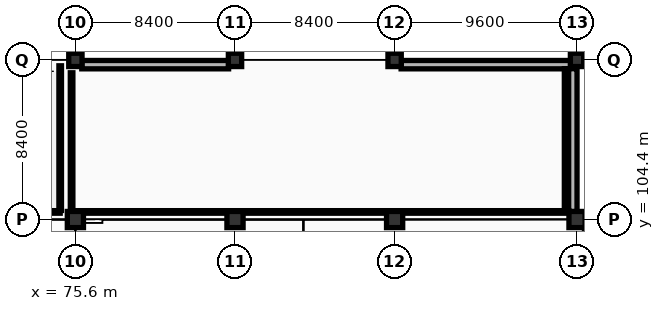
"""IFC4 building model, lengths in metres.
Left out: names, types, materials, properties, quantities, classifications, styles, units other than length and angle.
Written with IfcOpenShell. Run it as: python <this file> out.ifc"""

import sys

from ifc_helpers import new_model, si_unit, direction, frame, frame_2d, origin, origin_2d, place, context, subcontext, project, spatial, rectangle, extrude, element, fill, save


model = new_model("IFC4")
c1 = context("Model", 3, precision=1e-05, world=origin(), true_north=direction((0.0, 1.0)))
c2 = subcontext(c1, "Body", "Model", "MODEL_VIEW")
j1 = project(units=[si_unit("LENGTHUNIT", "METRE"), si_unit("PLANEANGLEUNIT", "RADIAN")], contexts=[c1])
p1 = place(None, origin())
s1 = spatial("IfcSite", under=j1, at=p1, CompositionType="ELEMENT")
p2 = place(p1, origin())
s2 = spatial("IfcBuilding", under=s1, at=p2, CompositionType="ELEMENT")
p3 = place(p2, origin())
s3 = spatial("IfcBuildingStorey", under=s2, at=p3, CompositionType="ELEMENT", Elevation=0.0)
p4 = place(p3, frame((75.6, 104.4, 0.0), z_axis=(0.0, 0.0, 1.0), x_axis=(1.0, 0.0, 0.0)))
e1 = element("IfcColumn", 1, at=p4, inside=s3, PredefinedType="COLUMN", context=c2, shape_type="SweptSolid", body=[
    extrude(rectangle(XDim=0.85, YDim=0.85, at=origin_2d()), origin(), (0.0, 0.0, 1.0), 5.4),
])
p5 = place(p3, frame((75.6, 112.8, 0.0), z_axis=(0.0, 0.0, 1.0), x_axis=(1.0, 0.0, 0.0)))
e2 = element("IfcColumn", 2, at=p5, inside=s3, PredefinedType="COLUMN", context=c2, shape_type="SweptSolid", body=[
    extrude(rectangle(XDim=0.7, YDim=0.7, at=origin_2d()), origin(), (0.0, 0.0, 1.0), 5.4),
])
p6 = place(p3, frame((84.0, 104.4, 0.0), z_axis=(0.0, 0.0, 1.0), x_axis=(1.0, 0.0, 0.0)))
e3 = element("IfcColumn", 3, at=p6, inside=s3, PredefinedType="COLUMN", context=c2, shape_type="SweptSolid", body=[
    extrude(rectangle(XDim=0.85, YDim=0.85, at=origin_2d()), origin(), (0.0, 0.0, 1.0), 5.4),
])
p7 = place(p3, frame((84.0, 112.8, 0.0), z_axis=(0.0, 0.0, 1.0), x_axis=(1.0, 0.0, 0.0)))
e4 = element("IfcColumn", 4, at=p7, inside=s3, PredefinedType="COLUMN", context=c2, shape_type="SweptSolid", body=[
    extrude(rectangle(XDim=0.7, YDim=0.7, at=origin_2d()), origin(), (0.0, 0.0, 1.0), 5.4),
])
p8 = place(p3, frame((92.4, 104.4, 0.0), z_axis=(0.0, 0.0, 1.0), x_axis=(1.0, 0.0, 0.0)))
e5 = element("IfcColumn", 5, at=p8, inside=s3, PredefinedType="COLUMN", context=c2, shape_type="SweptSolid", body=[
    extrude(rectangle(XDim=0.85, YDim=0.85, at=origin_2d()), origin(), (0.0, 0.0, 1.0), 5.4),
])
p9 = place(p3, frame((92.4, 112.8, 0.0), z_axis=(0.0, 0.0, 1.0), x_axis=(1.0, 0.0, 0.0)))
e6 = element("IfcColumn", 6, at=p9, inside=s3, PredefinedType="COLUMN", context=c2, shape_type="SweptSolid", body=[
    extrude(rectangle(XDim=0.7, YDim=0.7, at=origin_2d()), origin(), (0.0, 0.0, 1.0), 5.4),
])
p10 = place(p3, frame((102.0, 104.4, 0.0), z_axis=(0.0, 0.0, 1.0), x_axis=(1.0, 0.0, 0.0)))
e7 = element("IfcColumn", 7, at=p10, inside=s3, PredefinedType="COLUMN", context=c2, shape_type="SweptSolid", body=[
    extrude(rectangle(XDim=0.85, YDim=0.85, at=origin_2d()), origin(), (0.0, 0.0, 1.0), 5.4),
])
p11 = place(p3, frame((102.0, 112.8, 0.0), z_axis=(0.0, 0.0, 1.0), x_axis=(1.0, 0.0, 0.0)))
e8 = element("IfcColumn", 8, at=p11, inside=s3, PredefinedType="COLUMN", context=c2, shape_type="SweptSolid", body=[
    extrude(rectangle(XDim=0.7, YDim=0.7, at=origin_2d()), origin(), (0.0, 0.0, 1.0), 5.4),
])
p12 = place(p3, frame((75.937, 112.55, 0.0), z_axis=(0.0, 0.0, 1.0), x_axis=(1.0, 0.0, 0.0)))
e9 = element("IfcWall", 9, at=p12, inside=s3, PredefinedType="STANDARD", context=c2, shape_type="SweptSolid", body=[
    extrude(rectangle(XDim=7.726, YDim=0.44, at=frame_2d((3.863, 0.0))), origin(), (0.0, 0.0, 1.0), 4.67),
])
p13 = place(p12, frame((2.663, 0.0, 0.0)))
e10 = element("IfcOpeningElement", 10, at=p13, cuts=e9, PredefinedType="OPENING", context=c2, shape_type="SweptSolid", body=[
    extrude(rectangle(XDim=2.4, YDim=2.8, at=frame_2d((1.2, 1.4))), frame((0.0, 0.23, 0.0), z_axis=(0.0, -1.0, 0.0), x_axis=(1.0, 0.0, 0.0)), (0.0, 0.0, 1.0), 0.46),
])
p14 = place(p3, frame((92.742, 112.55, 0.0), z_axis=(0.0, 0.0, 1.0), x_axis=(1.0, 0.0, 0.0)))
e11 = element("IfcWall", 11, at=p14, inside=s3, PredefinedType="STANDARD", context=c2, shape_type="SweptSolid", body=[
    extrude(rectangle(XDim=8.921, YDim=0.44, at=frame_2d((4.46, 0.0))), origin(), (0.0, 0.0, 1.0), 4.62),
])
p15 = place(p14, frame((3.258, 0.0, 0.0)))
e12 = element("IfcOpeningElement", 12, at=p15, cuts=e11, PredefinedType="OPENING", context=c2, shape_type="SweptSolid", body=[
    extrude(rectangle(XDim=2.4, YDim=2.8, at=frame_2d((1.2, 1.4))), frame((0.0, 0.23, 0.0), z_axis=(0.0, -1.0, 0.0), x_axis=(1.0, 0.0, 0.0)), (0.0, 0.0, 1.0), 0.46),
])
p16 = place(p3, frame((101.78, 112.338, 0.0), z_axis=(0.0, 0.0, 1.0), x_axis=(0.0, -1.0, 0.0)))
e13 = element("IfcWall", 13, at=p16, inside=s3, PredefinedType="STANDARD", context=c2, shape_type="SweptSolid", body=[
    extrude(rectangle(XDim=7.521, YDim=0.44, at=frame_2d((3.76, 0.0))), origin(), (0.0, 0.0, 1.0), 4.27),
])
p17 = place(p16, frame((1.563, 0.0, 0.9)))
e14 = element("IfcOpeningElement", 14, at=p17, cuts=e13, PredefinedType="OPENING", context=c2, shape_type="SweptSolid", body=[
    extrude(rectangle(XDim=1.2, YDim=1.85, at=frame_2d((0.6, 0.925))), frame((0.0, 0.23, 0.0), z_axis=(0.0, -1.0, 0.0), x_axis=(1.0, 0.0, 0.0)), (0.0, 0.0, 1.0), 0.46),
])
p18 = place(p16, frame((4.713, 0.0, 0.9)))
e15 = element("IfcOpeningElement", 15, at=p18, cuts=e13, PredefinedType="OPENING", context=c2, shape_type="SweptSolid", body=[
    extrude(rectangle(XDim=1.2, YDim=1.85, at=frame_2d((0.6, 0.925))), frame((0.0, 0.23, 0.0), z_axis=(0.0, -1.0, 0.0), x_axis=(1.0, 0.0, 0.0)), (0.0, 0.0, 1.0), 0.46),
])
p19 = place(p3, frame((74.8, 104.8, 0.0), z_axis=(0.0, 0.0, 1.0), x_axis=(-1.0, 0.0, 0.0)))
e16 = element("IfcWall", 16, at=p19, inside=s3, PredefinedType="PARTITIONING", context=c2, shape_type="SweptSolid", body=[
    extrude(rectangle(XDim=15.4, YDim=0.135, at=frame_2d((7.7, 0.0))), origin(), (0.0, 0.0, 1.0), 4.27),
])
p20 = place(p19, frame((2.413, 0.0, 0.0)))
e17 = element("IfcOpeningElement", 17, at=p20, cuts=e16, PredefinedType="OPENING", context=c2, shape_type="SweptSolid", body=[
    extrude(rectangle(XDim=0.95, YDim=2.15, at=frame_2d((0.475, 1.075))), frame((0.0, 0.077, 0.0), z_axis=(0.0, -1.0, 0.0), x_axis=(1.0, 0.0, 0.0)), (0.0, 0.0, 1.0), 0.155),
])
p21 = place(p3, frame((74.8, 112.49, 0.0), z_axis=(0.0, 0.0, 1.0), x_axis=(0.0, -1.0, 0.0)))
e18 = element("IfcWall", 18, at=p21, inside=s3, PredefinedType="PARTITIONING", context=c2, shape_type="SweptSolid", body=[
    extrude(rectangle(XDim=7.613, YDim=0.135, at=frame_2d((3.806, 0.0))), origin(), (0.0, 0.0, 1.0), 4.67),
])
p22 = place(p3, frame((101.566, 104.8, 0.0), z_axis=(0.0, 0.0, 1.0), x_axis=(-1.0, 0.0, 0.0)))
e19 = element("IfcWall", 19, at=p22, inside=s3, PredefinedType="PARTITIONING", context=c2, shape_type="SweptSolid", body=[
    extrude(rectangle(XDim=26.166, YDim=0.135, at=frame_2d((13.083, 0.0))), origin(), (0.0, 0.0, 1.0), 4.27),
])
p23 = place(p22, frame((21.189, 0.0, 0.0)))
e20 = element("IfcOpeningElement", 20, at=p23, cuts=e19, PredefinedType="OPENING", context=c2, shape_type="SweptSolid", body=[
    extrude(rectangle(XDim=0.95, YDim=2.15, at=frame_2d((0.475, 1.075))), frame((0.0, 0.077, 0.0), z_axis=(0.0, -1.0, 0.0), x_axis=(1.0, 0.0, 0.0)), (0.0, 0.0, 1.0), 0.155),
])
p24 = place(p3, frame((75.4, 104.877, 0.0), z_axis=(0.0, 0.0, 1.0), x_axis=(0.0, 1.0, 0.0)))
e21 = element("IfcWall", 21, at=p24, inside=s3, PredefinedType="PARTITIONING", context=c2, shape_type="SweptSolid", body=[
    extrude(rectangle(XDim=7.245, YDim=0.135, at=frame_2d((3.623, 0.0))), origin(), (0.0, 0.0, 1.0), 4.27),
])
p25 = place(p3, frame((101.4, 112.336, 0.0), z_axis=(0.0, 0.0, 1.0), x_axis=(0.0, -1.0, 0.0)))
e22 = element("IfcWall", 22, at=p25, inside=s3, PredefinedType="PARTITIONING", context=c2, shape_type="SweptSolid", body=[
    extrude(rectangle(XDim=7.458, YDim=0.135, at=frame_2d((3.729, 0.0))), origin(), (0.0, 0.0, 1.0), 4.57),
])
p26 = place(p13, origin())
e23 = element("IfcDoor", 23, at=p26, inside=s3, OperationType="DOUBLE_DOOR_SINGLE_SWING", PredefinedType="DOOR", context=c2, shape_type="SweptSolid", body=[
    extrude(rectangle(XDim=2.4, YDim=2.8, at=frame_2d((1.2, 1.4))), frame((0.0, 0.025, 0.0), z_axis=(0.0, -1.0, 0.0), x_axis=(1.0, 0.0, 0.0)), (0.0, 0.0, 1.0), 0.05),
])
fill(e10, e23)
p27 = place(p15, origin())
e24 = element("IfcDoor", 24, at=p27, inside=s3, OperationType="DOUBLE_DOOR_SINGLE_SWING", PredefinedType="DOOR", context=c2, shape_type="SweptSolid", body=[
    extrude(rectangle(XDim=2.4, YDim=2.8, at=frame_2d((1.2, 1.4))), frame((0.0, 0.025, 0.0), z_axis=(0.0, -1.0, 0.0), x_axis=(1.0, 0.0, 0.0)), (0.0, 0.0, 1.0), 0.05),
])
fill(e12, e24)
p28 = place(p17, origin())
e25 = element("IfcWindow", 25, at=p28, inside=s3, PartitioningType="SINGLE_PANEL", PredefinedType="WINDOW", context=c2, shape_type="SweptSolid", body=[
    extrude(rectangle(XDim=1.2, YDim=1.85, at=frame_2d((0.6, 0.925))), frame((0.0, 0.03, 0.0), z_axis=(0.0, -1.0, 0.0), x_axis=(1.0, 0.0, 0.0)), (0.0, 0.0, 1.0), 0.06),
])
fill(e14, e25)
p29 = place(p18, origin())
e26 = element("IfcWindow", 26, at=p29, inside=s3, PartitioningType="SINGLE_PANEL", PredefinedType="WINDOW", context=c2, shape_type="SweptSolid", body=[
    extrude(rectangle(XDim=1.2, YDim=1.85, at=frame_2d((0.6, 0.925))), frame((0.0, 0.03, 0.0), z_axis=(0.0, -1.0, 0.0), x_axis=(1.0, 0.0, 0.0)), (0.0, 0.0, 1.0), 0.06),
])
fill(e15, e26)
p30 = place(p23, origin())
e27 = element("IfcDoor", 27, at=p30, inside=s3, OperationType="SINGLE_SWING_LEFT", PredefinedType="DOOR", context=c2, shape_type="SweptSolid", body=[
    extrude(rectangle(XDim=0.95, YDim=2.15, at=frame_2d((0.475, 1.075))), frame((0.0, 0.025, 0.0), z_axis=(0.0, -1.0, 0.0), x_axis=(1.0, 0.0, 0.0)), (0.0, 0.0, 1.0), 0.05),
])
fill(e20, e27)
save(model, sys.argv[1])
